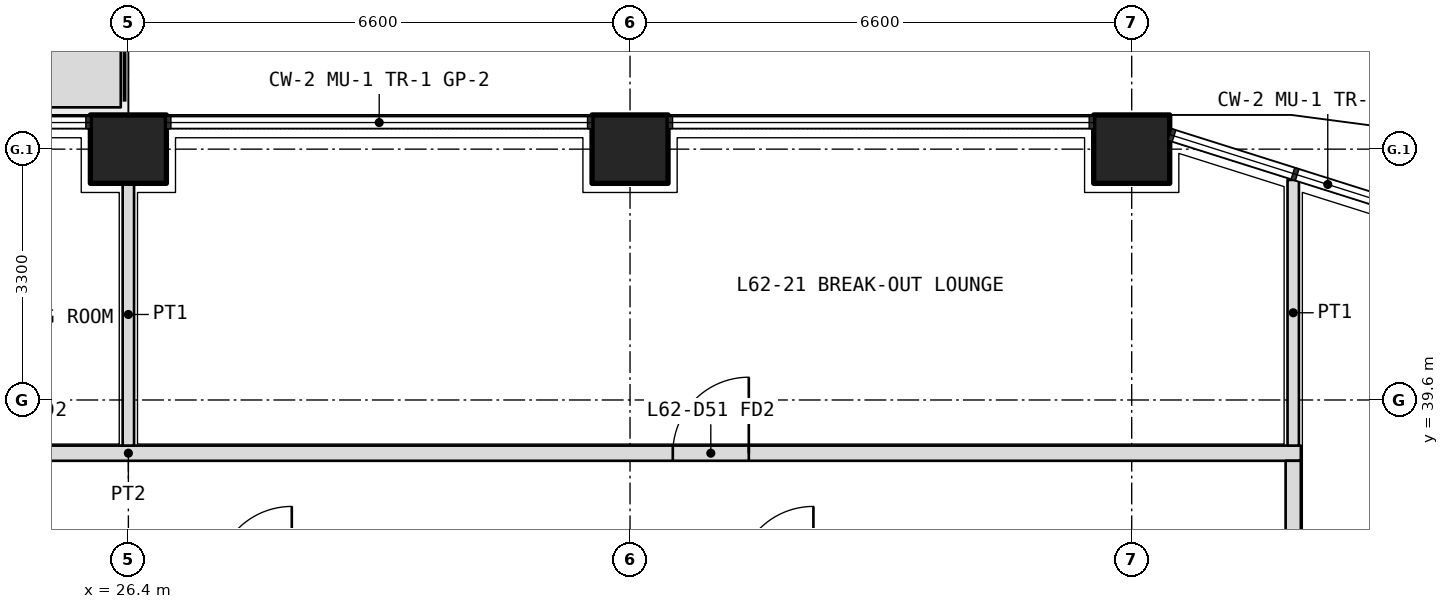
"""IFC4 building model, lengths in metres.
Left out: names, types, materials, properties, quantities, classifications, styles, units other than length and angle.
Written with IfcOpenShell. Run it as: python <this file> out.ifc"""

import sys

from ifc_helpers import new_model, si_unit, direction, frame, frame_2d, origin, origin_2d, place, context, subcontext, project, spatial, polyline, rectangle, outline, extrude, element, fill, save


model = new_model("IFC4")
c1 = context("Model", 3, precision=1e-05, world=origin(), true_north=direction((0.0, 1.0)))
c2 = subcontext(c1, "Body", "Model", "MODEL_VIEW")
j1 = project(units=[si_unit("LENGTHUNIT", "METRE"), si_unit("PLANEANGLEUNIT", "RADIAN")], contexts=[c1])
p1 = place(None, origin())
s1 = spatial("IfcSite", under=j1, at=p1, CompositionType="ELEMENT")
p2 = place(p1, origin())
s2 = spatial("IfcBuilding", under=s1, at=p2, CompositionType="ELEMENT")
p3 = place(p2, frame((0.0, 0.0, 271.2)))
s3 = spatial("IfcBuildingStorey", under=s2, at=p3, CompositionType="ELEMENT", Elevation=271.2)
for number, where, z_axis, x_axis in (
    (1, (26.4, 42.9, 0.0), (0.0, 0.0, 1.0), (1.0, 0.0, 0.0)),
    (2, (33.0, 42.9, 0.0), (0.0, 0.0, 1.0), (1.0, 0.0, 0.0)),
    (3, (39.6, 42.9, 0.0), (0.0, 0.0, 1.0), (1.0, 0.0, 0.0)),
):
    element("IfcColumn", number, at=place(p3, frame(where, z_axis=z_axis, x_axis=x_axis)), inside=s3, PredefinedType="COLUMN", context=c2, shape_type="SweptSolid", body=[
        extrude(rectangle(XDim=1.0, YDim=0.9, at=origin_2d()), origin(), (0.0, 0.0, 1.0), 4.2),
    ])
p4 = place(p3, origin())
e4 = element("IfcWall", 4, at=p4, inside=s3, PredefinedType="USERDEFINED", context=c2, shape_type="SweptSolid", body=[
    extrude(outline(polyline([(17.25, 43.45), (26.3, 43.45), (26.3, 44.45), (17.25, 44.45), (17.25, 43.45)]), holes=[polyline([(17.4, 43.6), (26.15, 43.6), (26.15, 44.3), (17.4, 44.3), (17.4, 43.6)])]), origin(), (0.0, 0.0, 1.0), 1.05),
])
p5 = place(p3, frame((10.975, 38.9, 0.0), z_axis=(0.0, 0.0, 1.0), x_axis=(1.0, 0.0, 0.0)))
e5 = element("IfcWall", 5, at=p5, inside=s3, PredefinedType="PARTITIONING", context=c2, shape_type="SweptSolid", body=[
    extrude(rectangle(XDim=30.85, YDim=0.2, at=frame_2d((15.425, 0.0))), origin(), (0.0, 0.0, 1.0), 3.0),
])
p6 = place(p5, frame((0.663, 0.0, 0.0)))
e6 = element("IfcOpeningElement", 6, at=p6, cuts=e5, PredefinedType="OPENING", context=c2, shape_type="SweptSolid", body=[
    extrude(rectangle(XDim=1.0, YDim=2.1, at=frame_2d((0.5, 1.05))), frame((0.0, 0.11, 0.0), z_axis=(0.0, -1.0, 0.0), x_axis=(1.0, 0.0, 0.0)), (0.0, 0.0, 1.0), 0.22),
])
p7 = place(p5, frame((3.375, 0.0, 0.0)))
e7 = element("IfcOpeningElement", 7, at=p7, cuts=e5, PredefinedType="OPENING", context=c2, shape_type="SweptSolid", body=[
    extrude(rectangle(XDim=1.0, YDim=2.1, at=frame_2d((0.5, 1.05))), frame((0.0, 0.11, 0.0), z_axis=(0.0, -1.0, 0.0), x_axis=(1.0, 0.0, 0.0)), (0.0, 0.0, 1.0), 0.22),
])
p8 = place(p5, frame((8.325, 0.0, 0.0)))
e8 = element("IfcOpeningElement", 8, at=p8, cuts=e5, PredefinedType="OPENING", context=c2, shape_type="SweptSolid", body=[
    extrude(rectangle(XDim=1.0, YDim=2.1, at=frame_2d((0.5, 1.05))), frame((0.0, 0.11, 0.0), z_axis=(0.0, -1.0, 0.0), x_axis=(1.0, 0.0, 0.0)), (0.0, 0.0, 1.0), 0.22),
])
p9 = place(p5, frame((13.275, 0.0, 0.0)))
e9 = element("IfcOpeningElement", 9, at=p9, cuts=e5, PredefinedType="OPENING", context=c2, shape_type="SweptSolid", body=[
    extrude(rectangle(XDim=1.0, YDim=2.1, at=frame_2d((0.5, 1.05))), frame((0.0, 0.11, 0.0), z_axis=(0.0, -1.0, 0.0), x_axis=(1.0, 0.0, 0.0)), (0.0, 0.0, 1.0), 0.22),
])
p10 = place(p5, frame((22.587, 0.0, 0.0)))
e10 = element("IfcOpeningElement", 10, at=p10, cuts=e5, PredefinedType="OPENING", context=c2, shape_type="SweptSolid", body=[
    extrude(rectangle(XDim=1.0, YDim=2.1, at=frame_2d((0.5, 1.05))), frame((0.0, 0.11, 0.0), z_axis=(0.0, -1.0, 0.0), x_axis=(1.0, 0.0, 0.0)), (0.0, 0.0, 1.0), 0.22),
])
p11 = place(p3, frame((41.725, 19.8, 0.0), z_axis=(0.0, 0.0, 1.0), x_axis=(0.0, 1.0, 0.0)))
e11 = element("IfcWall", 11, at=p11, inside=s3, PredefinedType="PARTITIONING", context=c2, shape_type="SweptSolid", body=[
    extrude(rectangle(XDim=19.0, YDim=0.2, at=frame_2d((9.5, 0.0))), origin(), (0.0, 0.0, 1.0), 3.0),
])
p12 = place(p11, frame((1.0, 0.0, 0.0)))
e12 = element("IfcOpeningElement", 12, at=p12, cuts=e11, PredefinedType="OPENING", context=c2, shape_type="SweptSolid", body=[
    extrude(rectangle(XDim=1.0, YDim=2.1, at=frame_2d((0.5, 1.05))), frame((0.0, 0.11, 0.0), z_axis=(0.0, -1.0, 0.0), x_axis=(1.0, 0.0, 0.0)), (0.0, 0.0, 1.0), 0.22),
])
p13 = place(p11, frame((4.35, 0.0, 0.0)))
e13 = element("IfcOpeningElement", 13, at=p13, cuts=e11, PredefinedType="OPENING", context=c2, shape_type="SweptSolid", body=[
    extrude(rectangle(XDim=0.9, YDim=2.1, at=frame_2d((0.45, 1.05))), frame((0.0, 0.11, 0.0), z_axis=(0.0, -1.0, 0.0), x_axis=(1.0, 0.0, 0.0)), (0.0, 0.0, 1.0), 0.22),
])
p14 = place(p11, frame((12.35, 0.0, 0.0)))
e14 = element("IfcOpeningElement", 14, at=p14, cuts=e11, PredefinedType="OPENING", context=c2, shape_type="SweptSolid", body=[
    extrude(rectangle(XDim=1.0, YDim=2.1, at=frame_2d((0.5, 1.05))), frame((0.0, 0.11, 0.0), z_axis=(0.0, -1.0, 0.0), x_axis=(1.0, 0.0, 0.0)), (0.0, 0.0, 1.0), 0.22),
])
p15 = place(p3, frame((41.725, 42.495, 0.0), z_axis=(0.0, 0.0, 1.0), x_axis=(0.0, -1.0, 0.0)))
e15 = element("IfcWall", 15, at=p15, inside=s3, PredefinedType="PARTITIONING", context=c2, shape_type="SweptSolid", body=[
    extrude(rectangle(XDim=3.495, YDim=0.15, at=frame_2d((1.748, 0.0))), origin(), (0.0, 0.0, 1.0), 2.7),
])
p16 = place(p3, frame((26.4, 42.45, 0.0), z_axis=(0.0, 0.0, 1.0), x_axis=(0.0, -1.0, 0.0)))
e16 = element("IfcWall", 16, at=p16, inside=s3, PredefinedType="PARTITIONING", context=c2, shape_type="SweptSolid", body=[
    extrude(rectangle(XDim=3.45, YDim=0.15, at=frame_2d((1.725, 0.0))), origin(), (0.0, 0.0, 1.0), 3.0),
])
p17 = place(p10, origin())
e17 = element("IfcDoor", 17, at=p17, inside=s3, OperationType="SINGLE_SWING_RIGHT", PredefinedType="DOOR", context=c2, shape_type="SweptSolid", body=[
    extrude(rectangle(XDim=1.0, YDim=2.1, at=frame_2d((0.5, 1.05))), frame((0.0, 0.025, 0.0), z_axis=(0.0, -1.0, 0.0), x_axis=(1.0, 0.0, 0.0)), (0.0, 0.0, 1.0), 0.05),
])
fill(e10, e17)
save(model, sys.argv[1])
